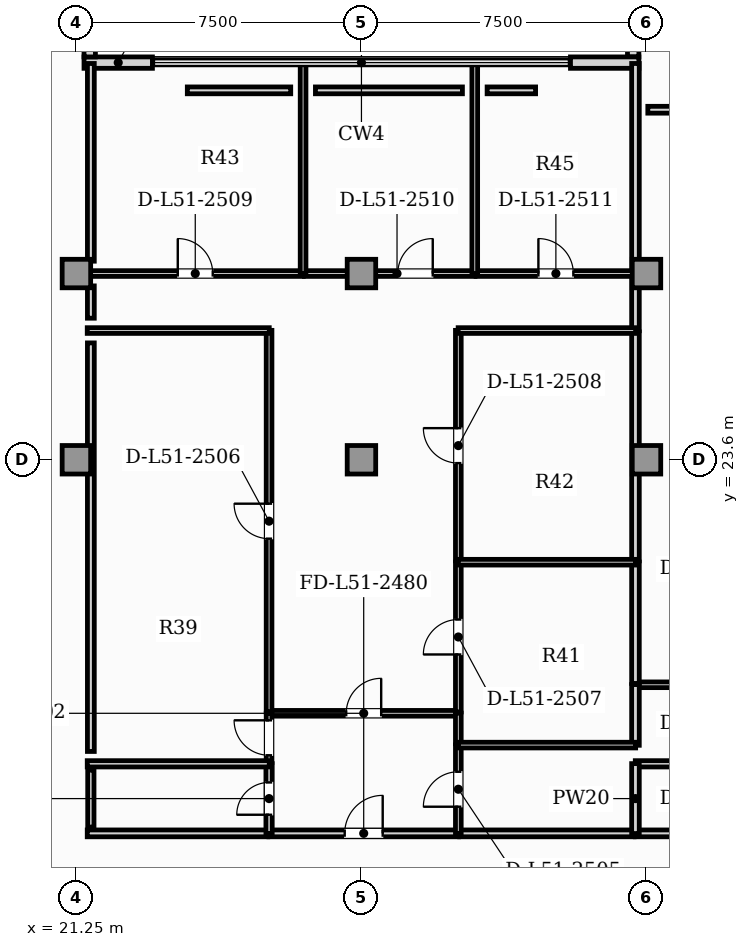
"""IFC4 building model, lengths in metres.
Left out: names, types, materials, properties, quantities, classifications, styles, units other than length and angle.
Written with IfcOpenShell. Run it as: python <this file> out.ifc"""

import sys

from ifc_helpers import new_model, si_unit, direction, frame, frame_2d, origin, origin_2d, place, context, subcontext, project, spatial, rectangle, extrude, element, fill, save


model = new_model("IFC4")
c1 = context("Model", 3, precision=1e-05, world=origin(), true_north=direction((0.0, 1.0)))
c2 = subcontext(c1, "Body", "Model", "MODEL_VIEW")
j1 = project(units=[si_unit("LENGTHUNIT", "METRE"), si_unit("PLANEANGLEUNIT", "RADIAN")], contexts=[c1])
p1 = place(None, origin())
s1 = spatial("IfcSite", under=j1, at=p1, CompositionType="ELEMENT")
p2 = place(p1, origin())
s2 = spatial("IfcBuilding", under=s1, at=p2, CompositionType="ELEMENT")
p3 = place(p2, frame((0.0, 0.0, 208.0)))
s3 = spatial("IfcBuildingStorey", under=s2, at=p3, CompositionType="ELEMENT", Elevation=208.0)
for number, where, z_axis, x_axis in (
    (1, (21.25, 23.6, 0.0), (0.0, 0.0, 1.0), (1.0, 0.0, 0.0)),
    (2, (28.75, 23.6, 0.0), (0.0, 0.0, 1.0), (1.0, 0.0, 0.0)),
    (3, (36.25, 23.6, 0.0), (0.0, 0.0, 1.0), (1.0, 0.0, 0.0)),
    (4, (21.25, 28.5, 0.0), (0.0, 0.0, 1.0), (1.0, 0.0, 0.0)),
    (5, (28.75, 28.5, 0.0), (0.0, 0.0, 1.0), (1.0, 0.0, 0.0)),
    (6, (36.25, 28.5, 0.0), (0.0, 0.0, 1.0), (1.0, 0.0, 0.0)),
):
    element("IfcColumn", number, at=place(p3, frame(where, z_axis=z_axis, x_axis=x_axis)), inside=s3, PredefinedType="COLUMN", context=c2, shape_type="SweptSolid", body=[
        extrude(rectangle(XDim=0.75, YDim=0.75, at=origin_2d()), origin(), (0.0, 0.0, 1.0), 3.85),
    ])
p4 = place(p3, frame((35.9, 40.36, 0.0), z_axis=(0.0, 0.0, 1.0), x_axis=(0.0, -1.0, 0.0)))
e7 = element("IfcWall", 7, at=p4, inside=s3, PredefinedType="SOLIDWALL", context=c2, shape_type="SweptSolid", body=[
    extrude(rectangle(XDim=6.16, YDim=0.3, at=frame_2d((3.08, 0.0))), origin(), (0.0, 0.0, 1.0), 3.63),
])
for number, where, z_axis, x_axis in (
    (8, (21.45, 34.05, 0.0), (0.0, 0.0, 1.0), (1.0, 0.0, 0.0)),
    (9, (34.25, 34.05, 0.0), (0.0, 0.0, 1.0), (1.0, 0.0, 0.0)),
):
    element("IfcWall", number, at=place(p3, frame(where, z_axis=z_axis, x_axis=x_axis)), inside=s3, PredefinedType="SOLIDWALL", context=c2, shape_type="SweptSolid", body=[
        extrude(rectangle(XDim=1.8, YDim=0.3, at=frame_2d((0.9, 0.0))), origin(), (0.0, 0.0, 1.0), 3.63),
    ])
p5 = place(p3, frame((21.6, 34.2, 0.0), z_axis=(0.0, 0.0, 1.0), x_axis=(0.0, 1.0, 0.0)))
e10 = element("IfcWall", 10, at=p5, inside=s3, PredefinedType="SOLIDWALL", context=c2, shape_type="SweptSolid", body=[
    extrude(rectangle(XDim=6.16, YDim=0.3, at=frame_2d((3.08, 0.0))), origin(), (0.0, 0.0, 1.0), 3.63),
])
p6 = place(p3, frame((35.955, 13.77, 0.0), z_axis=(0.0, 0.0, 1.0), x_axis=(1.0, 0.0, 0.0)))
e11 = element("IfcWall", 11, at=p6, inside=s3, PredefinedType="PARTITIONING", context=c2, shape_type="SweptSolid", body=[
    extrude(rectangle(XDim=5.203, YDim=0.18, at=frame_2d((2.602, 0.0))), origin(), (0.0, 0.0, 1.0), 3.63),
])
p7 = place(p3, frame((26.314, 13.77, 0.0), z_axis=(0.0, 0.0, 1.0), x_axis=(1.0, 0.0, 0.0)))
e12 = element("IfcWall", 12, at=p7, inside=s3, PredefinedType="PARTITIONING", context=c2, shape_type="SweptSolid", body=[
    extrude(rectangle(XDim=4.99, YDim=0.18, at=frame_2d((2.495, 0.0))), origin(), (0.0, 0.0, 1.0), 3.63),
])
p8 = place(p7, frame((1.995, 0.0, 0.0)))
e13 = element("IfcOpeningElement", 13, at=p8, cuts=e12, PredefinedType="OPENING", context=c2, shape_type="SweptSolid", body=[
    extrude(rectangle(XDim=1.0, YDim=2.15, at=frame_2d((0.5, 1.075))), frame((0.0, 0.1, 0.0), z_axis=(0.0, -1.0, 0.0), x_axis=(1.0, 0.0, 0.0)), (0.0, 0.0, 1.0), 0.2),
])
p9 = place(p3, frame((21.535, 13.77, 0.0), z_axis=(0.0, 0.0, 1.0), x_axis=(1.0, 0.0, 0.0)))
e14 = element("IfcWall", 14, at=p9, inside=s3, PredefinedType="PARTITIONING", context=c2, shape_type="SweptSolid", body=[
    extrude(rectangle(XDim=4.749, YDim=0.18, at=frame_2d((2.375, 0.0))), origin(), (0.0, 0.0, 1.0), 3.63),
])
p10 = place(p3, frame((31.334, 13.77, 0.0), z_axis=(0.0, 0.0, 1.0), x_axis=(1.0, 0.0, 0.0)))
e15 = element("IfcWall", 15, at=p10, inside=s3, PredefinedType="PARTITIONING", context=c2, shape_type="SweptSolid", body=[
    extrude(rectangle(XDim=4.591, YDim=0.18, at=frame_2d((2.295, 0.0))), origin(), (0.0, 0.0, 1.0), 3.63),
])
p11 = place(p3, frame((35.955, 15.6, 0.0), z_axis=(0.0, 0.0, 1.0), x_axis=(1.0, 0.0, 0.0)))
e16 = element("IfcWall", 16, at=p11, inside=s3, PredefinedType="PLUMBINGWALL", context=c2, shape_type="SweptSolid", body=[
    extrude(rectangle(XDim=5.243, YDim=0.165, at=frame_2d((2.622, 0.0))), origin(), (0.0, 0.0, 1.0), 3.63),
])
p12 = place(p3, frame((35.96, 13.765, 0.0), z_axis=(0.0, 0.0, 1.0), x_axis=(0.0, 1.0, 0.0)))
e17 = element("IfcWall", 17, at=p12, inside=s3, PredefinedType="PARTITIONING", context=c2, shape_type="SweptSolid", body=[
    extrude(rectangle(XDim=1.84, YDim=0.2, at=frame_2d((0.92, 0.0))), origin(), (0.0, 0.0, 1.0), 3.63),
])
p13 = place(p3, frame((35.955, 17.68, 0.0), z_axis=(0.0, 0.0, 1.0), x_axis=(1.0, 0.0, 0.0)))
e18 = element("IfcWall", 18, at=p13, inside=s3, PredefinedType="PARTITIONING", context=c2, shape_type="SweptSolid", body=[
    extrude(rectangle(XDim=5.243, YDim=0.15, at=frame_2d((2.622, 0.0))), origin(), (0.0, 0.0, 1.0), 3.63),
])
p14 = place(p3, frame((35.96, 16.087, 0.0), z_axis=(0.0, 0.0, 1.0), x_axis=(0.0, 1.0, 0.0)))
e19 = element("IfcWall", 19, at=p14, inside=s3, PredefinedType="PARTITIONING", context=c2, shape_type="SweptSolid", body=[
    extrude(rectangle(XDim=1.597, YDim=0.2, at=frame_2d((0.799, 0.0))), origin(), (0.0, 0.0, 1.0), 3.63),
])
p15 = place(p3, frame((35.96, 26.995, 0.0), z_axis=(0.0, 0.0, 1.0), x_axis=(0.0, 1.0, 0.0)))
e20 = element("IfcWall", 20, at=p15, inside=s3, PredefinedType="PARTITIONING", context=c2, shape_type="SweptSolid", body=[
    extrude(rectangle(XDim=1.51, YDim=0.2, at=frame_2d((0.755, 0.0))), origin(), (0.0, 0.0, 1.0), 3.63),
])
p16 = place(p3, frame((35.96, 17.715, 0.0), z_axis=(0.0, 0.0, 1.0), x_axis=(0.0, 1.0, 0.0)))
e21 = element("IfcWall", 21, at=p16, inside=s3, PredefinedType="PARTITIONING", context=c2, shape_type="SweptSolid", body=[
    extrude(rectangle(XDim=3.195, YDim=0.2, at=frame_2d((1.598, 0.0))), origin(), (0.0, 0.0, 1.0), 3.63),
])
p17 = place(p3, frame((35.96, 20.94, 0.0), z_axis=(0.0, 0.0, 1.0), x_axis=(0.0, 1.0, 0.0)))
e22 = element("IfcWall", 22, at=p17, inside=s3, PredefinedType="PARTITIONING", context=c2, shape_type="SweptSolid", body=[
    extrude(rectangle(XDim=6.025, YDim=0.2, at=frame_2d((3.013, 0.0))), origin(), (0.0, 0.0, 1.0), 3.63),
])
p18 = place(p3, frame((35.96, 28.535, 0.0), z_axis=(0.0, 0.0, 1.0), x_axis=(0.0, 1.0, 0.0)))
e23 = element("IfcWall", 23, at=p18, inside=s3, PredefinedType="PARTITIONING", context=c2, shape_type="SweptSolid", body=[
    extrude(rectangle(XDim=5.493, YDim=0.2, at=frame_2d((2.746, 0.0))), origin(), (0.0, 0.0, 1.0), 3.63),
])
p19 = place(p3, frame((26.314, 16.929, 0.0), z_axis=(0.0, 0.0, 1.0), x_axis=(1.0, 0.0, 0.0)))
e24 = element("IfcWall", 24, at=p19, inside=s3, PredefinedType="PARTITIONING", context=c2, shape_type="SweptSolid", body=[
    extrude(rectangle(XDim=4.99, YDim=0.15, at=frame_2d((2.495, 0.0))), origin(), (0.0, 0.0, 1.0), 3.63),
])
p20 = place(p19, frame((2.035, 0.0, 0.0)))
e25 = element("IfcOpeningElement", 25, at=p20, cuts=e24, PredefinedType="OPENING", context=c2, shape_type="SweptSolid", body=[
    extrude(rectangle(XDim=0.92, YDim=2.1, at=frame_2d((0.46, 1.05))), frame((0.0, 0.085, 0.0), z_axis=(0.0, -1.0, 0.0), x_axis=(1.0, 0.0, 0.0)), (0.0, 0.0, 1.0), 0.17),
])
p21 = place(p3, frame((26.319, 13.765, 0.0), z_axis=(0.0, 0.0, 1.0), x_axis=(0.0, 1.0, 0.0)))
e26 = element("IfcWall", 26, at=p21, inside=s3, PredefinedType="PLUMBINGWALL", context=c2, shape_type="SweptSolid", body=[
    extrude(rectangle(XDim=1.84, YDim=0.165, at=frame_2d((0.92, 0.0))), origin(), (0.0, 0.0, 1.0), 3.63),
])
p22 = place(p21, frame((0.495, 0.0, 0.0)))
e27 = element("IfcOpeningElement", 27, at=p22, cuts=e26, PredefinedType="OPENING", context=c2, shape_type="SweptSolid", body=[
    extrude(rectangle(XDim=0.85, YDim=2.1, at=frame_2d((0.425, 1.05))), frame((0.0, 0.093, 0.0), z_axis=(0.0, -1.0, 0.0), x_axis=(1.0, 0.0, 0.0)), (0.0, 0.0, 1.0), 0.185),
])
p23 = place(p3, frame((26.319, 15.635, 0.0), z_axis=(0.0, 0.0, 1.0), x_axis=(0.0, 1.0, 0.0)))
e28 = element("IfcWall", 28, at=p23, inside=s3, PredefinedType="PARTITIONING", context=c2, shape_type="SweptSolid", body=[
    extrude(rectangle(XDim=1.299, YDim=0.15, at=frame_2d((0.65, 0.0))), origin(), (0.0, 0.0, 1.0), 3.63),
])
p24 = place(p23, frame((0.19, 0.0, 0.0)))
e29 = element("IfcOpeningElement", 29, at=p24, cuts=e28, PredefinedType="OPENING", context=c2, shape_type="SweptSolid", body=[
    extrude(rectangle(XDim=0.92, YDim=2.1, at=frame_2d((0.46, 1.05))), frame((0.0, 0.085, 0.0), z_axis=(0.0, -1.0, 0.0), x_axis=(1.0, 0.0, 0.0)), (0.0, 0.0, 1.0), 0.17),
])
p25 = place(p3, frame((31.299, 13.765, 0.0), z_axis=(0.0, 0.0, 1.0), x_axis=(0.0, 1.0, 0.0)))
e30 = element("IfcWall", 30, at=p25, inside=s3, PredefinedType="PARTITIONING", context=c2, shape_type="SweptSolid", body=[
    extrude(rectangle(XDim=2.333, YDim=0.15, at=frame_2d((1.166, 0.0))), origin(), (0.0, 0.0, 1.0), 3.63),
])
p26 = place(p25, frame((0.706, 0.0, 0.0)))
e31 = element("IfcOpeningElement", 31, at=p26, cuts=e30, PredefinedType="OPENING", context=c2, shape_type="SweptSolid", body=[
    extrude(rectangle(XDim=0.92, YDim=2.1, at=frame_2d((0.46, 1.05))), frame((0.0, 0.085, 0.0), z_axis=(0.0, -1.0, 0.0), x_axis=(1.0, 0.0, 0.0)), (0.0, 0.0, 1.0), 0.17),
])
p27 = place(p3, frame((31.299, 16.127, 0.0), z_axis=(0.0, 0.0, 1.0), x_axis=(0.0, 1.0, 0.0)))
e32 = element("IfcWall", 32, at=p27, inside=s3, PredefinedType="PARTITIONING", context=c2, shape_type="SweptSolid", body=[
    extrude(rectangle(XDim=0.807, YDim=0.15, at=frame_2d((0.403, 0.0))), origin(), (0.0, 0.0, 1.0), 3.63),
])
p28 = place(p3, frame((26.319, 16.964, 0.0), z_axis=(0.0, 0.0, 1.0), x_axis=(0.0, 1.0, 0.0)))
e33 = element("IfcWall", 33, at=p28, inside=s3, PredefinedType="PARTITIONING", context=c2, shape_type="SweptSolid", body=[
    extrude(rectangle(XDim=10.041, YDim=0.15, at=frame_2d((5.02, 0.0))), origin(), (0.0, 0.0, 1.0), 3.63),
])
p29 = place(p28, frame((4.56, 0.0, 0.0)))
e34 = element("IfcOpeningElement", 34, at=p29, cuts=e33, PredefinedType="OPENING", context=c2, shape_type="SweptSolid", body=[
    extrude(rectangle(XDim=0.92, YDim=2.1, at=frame_2d((0.46, 1.05))), frame((0.0, 0.085, 0.0), z_axis=(0.0, -1.0, 0.0), x_axis=(1.0, 0.0, 0.0)), (0.0, 0.0, 1.0), 0.17),
])
p30 = place(p3, frame((21.535, 27.0, 0.0), z_axis=(0.0, 0.0, 1.0), x_axis=(1.0, 0.0, 0.0)))
e35 = element("IfcWall", 35, at=p30, inside=s3, PredefinedType="PARTITIONING", context=c2, shape_type="SweptSolid", body=[
    extrude(rectangle(XDim=4.789, YDim=0.15, at=frame_2d((2.395, 0.0))), origin(), (0.0, 0.0, 1.0), 3.63),
])
p31 = place(p3, frame((31.299, 16.964, 0.0), z_axis=(0.0, 0.0, 1.0), x_axis=(0.0, 1.0, 0.0)))
e36 = element("IfcWall", 36, at=p31, inside=s3, PredefinedType="PARTITIONING", context=c2, shape_type="SweptSolid", body=[
    extrude(rectangle(XDim=3.946, YDim=0.15, at=frame_2d((1.973, 0.0))), origin(), (0.0, 0.0, 1.0), 3.63),
])
p32 = place(p31, frame((1.513, 0.0, 0.0)))
e37 = element("IfcOpeningElement", 37, at=p32, cuts=e36, PredefinedType="OPENING", context=c2, shape_type="SweptSolid", body=[
    extrude(rectangle(XDim=0.92, YDim=2.1, at=frame_2d((0.46, 1.05))), frame((0.0, 0.085, 0.0), z_axis=(0.0, -1.0, 0.0), x_axis=(1.0, 0.0, 0.0)), (0.0, 0.0, 1.0), 0.17),
])
p33 = place(p3, frame((31.299, 20.94, 0.0), z_axis=(0.0, 0.0, 1.0), x_axis=(0.0, 1.0, 0.0)))
e38 = element("IfcWall", 38, at=p33, inside=s3, PredefinedType="PARTITIONING", context=c2, shape_type="SweptSolid", body=[
    extrude(rectangle(XDim=6.065, YDim=0.15, at=frame_2d((3.032, 0.0))), origin(), (0.0, 0.0, 1.0), 3.63),
])
p34 = place(p33, frame((2.573, 0.0, 0.0)))
e39 = element("IfcOpeningElement", 39, at=p34, cuts=e38, PredefinedType="OPENING", context=c2, shape_type="SweptSolid", body=[
    extrude(rectangle(XDim=0.92, YDim=2.1, at=frame_2d((0.46, 1.05))), frame((0.0, 0.085, 0.0), z_axis=(0.0, -1.0, 0.0), x_axis=(1.0, 0.0, 0.0)), (0.0, 0.0, 1.0), 0.17),
])
p35 = place(p3, frame((31.294, 27.0, 0.0), z_axis=(0.0, 0.0, 1.0), x_axis=(1.0, 0.0, 0.0)))
e40 = element("IfcWall", 40, at=p35, inside=s3, PredefinedType="PARTITIONING", context=c2, shape_type="SweptSolid", body=[
    extrude(rectangle(XDim=4.671, YDim=0.15, at=frame_2d((2.335, 0.0))), origin(), (0.0, 0.0, 1.0), 3.63),
])
p36 = place(p3, frame((21.535, 28.5, 0.0), z_axis=(0.0, 0.0, 1.0), x_axis=(1.0, 0.0, 0.0)))
e41 = element("IfcWall", 41, at=p36, inside=s3, PredefinedType="PARTITIONING", context=c2, shape_type="SweptSolid", body=[
    extrude(rectangle(XDim=5.684, YDim=0.15, at=frame_2d((2.842, 0.0))), origin(), (0.0, 0.0, 1.0), 3.63),
])
p37 = place(p36, frame((2.382, 0.0, 0.0)))
e42 = element("IfcOpeningElement", 42, at=p37, cuts=e41, PredefinedType="OPENING", context=c2, shape_type="SweptSolid", body=[
    extrude(rectangle(XDim=0.92, YDim=2.1, at=frame_2d((0.46, 1.05))), frame((0.0, 0.085, 0.0), z_axis=(0.0, -1.0, 0.0), x_axis=(1.0, 0.0, 0.0)), (0.0, 0.0, 1.0), 0.17),
])
p38 = place(p3, frame((27.249, 28.5, 0.0), z_axis=(0.0, 0.0, 1.0), x_axis=(1.0, 0.0, 0.0)))
e43 = element("IfcWall", 43, at=p38, inside=s3, PredefinedType="PARTITIONING", context=c2, shape_type="SweptSolid", body=[
    extrude(rectangle(XDim=4.488, YDim=0.15, at=frame_2d((2.244, 0.0))), origin(), (0.0, 0.0, 1.0), 3.63),
])
p39 = place(p38, frame((2.457, 0.0, 0.0)))
e44 = element("IfcOpeningElement", 44, at=p39, cuts=e43, PredefinedType="OPENING", context=c2, shape_type="SweptSolid", body=[
    extrude(rectangle(XDim=0.92, YDim=2.1, at=frame_2d((0.46, 1.05))), frame((0.0, 0.085, 0.0), z_axis=(0.0, -1.0, 0.0), x_axis=(1.0, 0.0, 0.0)), (0.0, 0.0, 1.0), 0.17),
])
p40 = place(p3, frame((31.767, 28.5, 0.0), z_axis=(0.0, 0.0, 1.0), x_axis=(1.0, 0.0, 0.0)))
e45 = element("IfcWall", 45, at=p40, inside=s3, PredefinedType="PARTITIONING", context=c2, shape_type="SweptSolid", body=[
    extrude(rectangle(XDim=4.198, YDim=0.15, at=frame_2d((2.099, 0.0))), origin(), (0.0, 0.0, 1.0), 3.63),
])
p41 = place(p40, frame((1.639, 0.0, 0.0)))
e46 = element("IfcOpeningElement", 46, at=p41, cuts=e45, PredefinedType="OPENING", context=c2, shape_type="SweptSolid", body=[
    extrude(rectangle(XDim=0.92, YDim=2.1, at=frame_2d((0.46, 1.05))), frame((0.0, 0.085, 0.0), z_axis=(0.0, -1.0, 0.0), x_axis=(1.0, 0.0, 0.0)), (0.0, 0.0, 1.0), 0.17),
])
p42 = place(p3, frame((21.535, 15.6, 0.0), z_axis=(0.0, 0.0, 1.0), x_axis=(1.0, 0.0, 0.0)))
e47 = element("IfcWall", 47, at=p42, inside=s3, PredefinedType="PLUMBINGWALL", context=c2, shape_type="SweptSolid", body=[
    extrude(rectangle(XDim=4.789, YDim=0.165, at=frame_2d((2.395, 0.0))), origin(), (0.0, 0.0, 1.0), 3.63),
])
for number, where, z_axis, x_axis in (
    (48, (31.294, 16.093, 0.0), (0.0, 0.0, 1.0), (1.0, 0.0, 0.0)),
    (49, (31.294, 20.905, 0.0), (0.0, 0.0, 1.0), (1.0, 0.0, 0.0)),
):
    element("IfcWall", number, at=place(p3, frame(where, z_axis=z_axis, x_axis=x_axis)), inside=s3, PredefinedType="PARTITIONING", context=c2, shape_type="SweptSolid", body=[
        extrude(rectangle(XDim=4.671, YDim=0.15, at=frame_2d((2.335, 0.0))), origin(), (0.0, 0.0, 1.0), 3.63),
    ])
for number, where, z_axis, x_axis in (
    (50, (27.214, 28.495, 0.0), (0.0, 0.0, 1.0), (0.0, 1.0, 0.0)),
    (51, (31.732, 28.495, 0.0), (0.0, 0.0, 1.0), (0.0, 1.0, 0.0)),
):
    element("IfcWall", number, at=place(p3, frame(where, z_axis=z_axis, x_axis=x_axis)), inside=s3, PredefinedType="PARTITIONING", context=c2, shape_type="SweptSolid", body=[
        extrude(rectangle(XDim=5.537, YDim=0.15, at=frame_2d((2.769, 0.0))), origin(), (0.0, 0.0, 1.0), 3.63),
    ])
p43 = place(p3, frame((36.285, 32.81, 0.0), z_axis=(0.0, 0.0, 1.0), x_axis=(1.0, 0.0, 0.0)))
e52 = element("IfcWall", 52, at=p43, inside=s3, PredefinedType="PARTITIONING", context=c2, shape_type="SweptSolid", body=[
    extrude(rectangle(XDim=4.583, YDim=0.18, at=frame_2d((2.292, 0.0))), origin(), (0.0, 0.0, 1.0), 3.63),
])
p44 = place(p3, frame((21.63, 27.325, 0.0), z_axis=(0.0, 0.0, 1.0), x_axis=(0.0, 1.0, 0.0)))
e53 = element("IfcWall", 53, at=p44, inside=s3, PredefinedType="PARTITIONING", context=c2, shape_type="SweptSolid", body=[
    extrude(rectangle(XDim=0.85, YDim=0.18, at=frame_2d((0.425, 0.0))), origin(), (0.0, 0.0, 1.0), 3.63),
])
p45 = place(p3, frame((21.63, 13.935, 0.0), z_axis=(0.0, 0.0, 1.0), x_axis=(0.0, 1.0, 0.0)))
e54 = element("IfcWall", 54, at=p45, inside=s3, PredefinedType="PLUMBINGWALL", context=c2, shape_type="SweptSolid", body=[
    extrude(rectangle(XDim=1.5, YDim=0.165, at=frame_2d((0.75, 0.0))), origin(), (0.0, 0.0, 1.0), 3.63),
])
p46 = place(p3, frame((21.63, 15.925, 0.0), z_axis=(0.0, 0.0, 1.0), x_axis=(0.0, 1.0, 0.0)))
e55 = element("IfcWall", 55, at=p46, inside=s3, PredefinedType="PARTITIONING", context=c2, shape_type="SweptSolid", body=[
    extrude(rectangle(XDim=10.75, YDim=0.18, at=frame_2d((5.375, 0.0))), origin(), (0.0, 0.0, 1.0), 3.63),
])
p47 = place(p3, frame((21.63, 28.825, 0.0), z_axis=(0.0, 0.0, 1.0), x_axis=(0.0, 1.0, 0.0)))
e56 = element("IfcWall", 56, at=p47, inside=s3, PredefinedType="PARTITIONING", context=c2, shape_type="SweptSolid", body=[
    extrude(rectangle(XDim=5.203, YDim=0.18, at=frame_2d((2.601, 0.0))), origin(), (0.0, 0.0, 1.0), 3.63),
])
p48 = place(p3, frame((24.168, 33.32, 0.0), z_axis=(0.0, 0.0, 1.0), x_axis=(1.0, 0.0, 0.0)))
e57 = element("IfcWall", 57, at=p48, inside=s3, PredefinedType="PARTITIONING", context=c2, shape_type="SweptSolid", body=[
    extrude(rectangle(XDim=2.721, YDim=0.18, at=frame_2d((1.361, 0.0))), origin(), (0.0, 0.0, 1.0), 3.63),
])
p49 = place(p3, frame((27.539, 33.32, 0.0), z_axis=(0.0, 0.0, 1.0), x_axis=(1.0, 0.0, 0.0)))
e58 = element("IfcWall", 58, at=p49, inside=s3, PredefinedType="PARTITIONING", context=c2, shape_type="SweptSolid", body=[
    extrude(rectangle(XDim=3.867, YDim=0.18, at=frame_2d((1.934, 0.0))), origin(), (0.0, 0.0, 1.0), 3.63),
])
p50 = place(p3, frame((32.057, 33.32, 0.0), z_axis=(0.0, 0.0, 1.0), x_axis=(1.0, 0.0, 0.0)))
e59 = element("IfcWall", 59, at=p50, inside=s3, PredefinedType="PARTITIONING", context=c2, shape_type="SweptSolid", body=[
    extrude(rectangle(XDim=1.275, YDim=0.18, at=frame_2d((0.638, 0.0))), origin(), (0.0, 0.0, 1.0), 3.63),
])
p51 = place(p8, origin())
e60 = element("IfcDoor", 60, at=p51, inside=s3, OperationType="SINGLE_SWING_RIGHT", PredefinedType="DOOR", context=c2, shape_type="SweptSolid", body=[
    extrude(rectangle(XDim=1.0, YDim=2.15, at=frame_2d((0.5, 1.075))), frame((0.0, 0.025, 0.0), z_axis=(0.0, -1.0, 0.0), x_axis=(1.0, 0.0, 0.0)), (0.0, 0.0, 1.0), 0.05),
])
fill(e13, e60)
p52 = place(p20, origin())
e61 = element("IfcDoor", 61, at=p52, inside=s3, OperationType="SINGLE_SWING_RIGHT", PredefinedType="DOOR", context=c2, shape_type="SweptSolid", body=[
    extrude(rectangle(XDim=0.92, YDim=2.1, at=frame_2d((0.46, 1.05))), frame((0.0, 0.025, 0.0), z_axis=(0.0, -1.0, 0.0), x_axis=(1.0, 0.0, 0.0)), (0.0, 0.0, 1.0), 0.05),
])
fill(e25, e61)
p53 = place(p22, origin())
e62 = element("IfcDoor", 62, at=p53, inside=s3, OperationType="SINGLE_SWING_LEFT", PredefinedType="DOOR", context=c2, shape_type="SweptSolid", body=[
    extrude(rectangle(XDim=0.85, YDim=2.1, at=frame_2d((0.425, 1.05))), frame((0.0, 0.025, 0.0), z_axis=(0.0, -1.0, 0.0), x_axis=(1.0, 0.0, 0.0)), (0.0, 0.0, 1.0), 0.05),
])
fill(e27, e62)
p54 = place(p24, origin())
e63 = element("IfcDoor", 63, at=p54, inside=s3, OperationType="SINGLE_SWING_RIGHT", PredefinedType="DOOR", context=c2, shape_type="SweptSolid", body=[
    extrude(rectangle(XDim=0.92, YDim=2.1, at=frame_2d((0.46, 1.05))), frame((0.0, 0.025, 0.0), z_axis=(0.0, -1.0, 0.0), x_axis=(1.0, 0.0, 0.0)), (0.0, 0.0, 1.0), 0.05),
])
fill(e29, e63)
p55 = place(p26, origin())
e64 = element("IfcDoor", 64, at=p55, inside=s3, OperationType="SINGLE_SWING_LEFT", PredefinedType="DOOR", context=c2, shape_type="SweptSolid", body=[
    extrude(rectangle(XDim=0.92, YDim=2.1, at=frame_2d((0.46, 1.05))), frame((0.0, 0.025, 0.0), z_axis=(0.0, -1.0, 0.0), x_axis=(1.0, 0.0, 0.0)), (0.0, 0.0, 1.0), 0.05),
])
fill(e31, e64)
p56 = place(p29, origin())
e65 = element("IfcDoor", 65, at=p56, inside=s3, OperationType="SINGLE_SWING_RIGHT", PredefinedType="DOOR", context=c2, shape_type="SweptSolid", body=[
    extrude(rectangle(XDim=0.92, YDim=2.1, at=frame_2d((0.46, 1.05))), frame((0.0, 0.025, 0.0), z_axis=(0.0, -1.0, 0.0), x_axis=(1.0, 0.0, 0.0)), (0.0, 0.0, 1.0), 0.05),
])
fill(e34, e65)
p57 = place(p32, origin())
e66 = element("IfcDoor", 66, at=p57, inside=s3, OperationType="SINGLE_SWING_LEFT", PredefinedType="DOOR", context=c2, shape_type="SweptSolid", body=[
    extrude(rectangle(XDim=0.92, YDim=2.1, at=frame_2d((0.46, 1.05))), frame((0.0, 0.025, 0.0), z_axis=(0.0, -1.0, 0.0), x_axis=(1.0, 0.0, 0.0)), (0.0, 0.0, 1.0), 0.05),
])
fill(e37, e66)
p58 = place(p34, origin())
e67 = element("IfcDoor", 67, at=p58, inside=s3, OperationType="SINGLE_SWING_RIGHT", PredefinedType="DOOR", context=c2, shape_type="SweptSolid", body=[
    extrude(rectangle(XDim=0.92, YDim=2.1, at=frame_2d((0.46, 1.05))), frame((0.0, 0.025, 0.0), z_axis=(0.0, -1.0, 0.0), x_axis=(1.0, 0.0, 0.0)), (0.0, 0.0, 1.0), 0.05),
])
fill(e39, e67)
p59 = place(p37, origin())
e68 = element("IfcDoor", 68, at=p59, inside=s3, OperationType="SINGLE_SWING_LEFT", PredefinedType="DOOR", context=c2, shape_type="SweptSolid", body=[
    extrude(rectangle(XDim=0.92, YDim=2.1, at=frame_2d((0.46, 1.05))), frame((0.0, 0.025, 0.0), z_axis=(0.0, -1.0, 0.0), x_axis=(1.0, 0.0, 0.0)), (0.0, 0.0, 1.0), 0.05),
])
fill(e42, e68)
p60 = place(p39, origin())
e69 = element("IfcDoor", 69, at=p60, inside=s3, OperationType="SINGLE_SWING_RIGHT", PredefinedType="DOOR", context=c2, shape_type="SweptSolid", body=[
    extrude(rectangle(XDim=0.92, YDim=2.1, at=frame_2d((0.46, 1.05))), frame((0.0, 0.025, 0.0), z_axis=(0.0, -1.0, 0.0), x_axis=(1.0, 0.0, 0.0)), (0.0, 0.0, 1.0), 0.05),
])
fill(e44, e69)
p61 = place(p41, origin())
e70 = element("IfcDoor", 70, at=p61, inside=s3, OperationType="SINGLE_SWING_LEFT", PredefinedType="DOOR", context=c2, shape_type="SweptSolid", body=[
    extrude(rectangle(XDim=0.92, YDim=2.1, at=frame_2d((0.46, 1.05))), frame((0.0, 0.025, 0.0), z_axis=(0.0, -1.0, 0.0), x_axis=(1.0, 0.0, 0.0)), (0.0, 0.0, 1.0), 0.05),
])
fill(e46, e70)
save(model, sys.argv[1])
